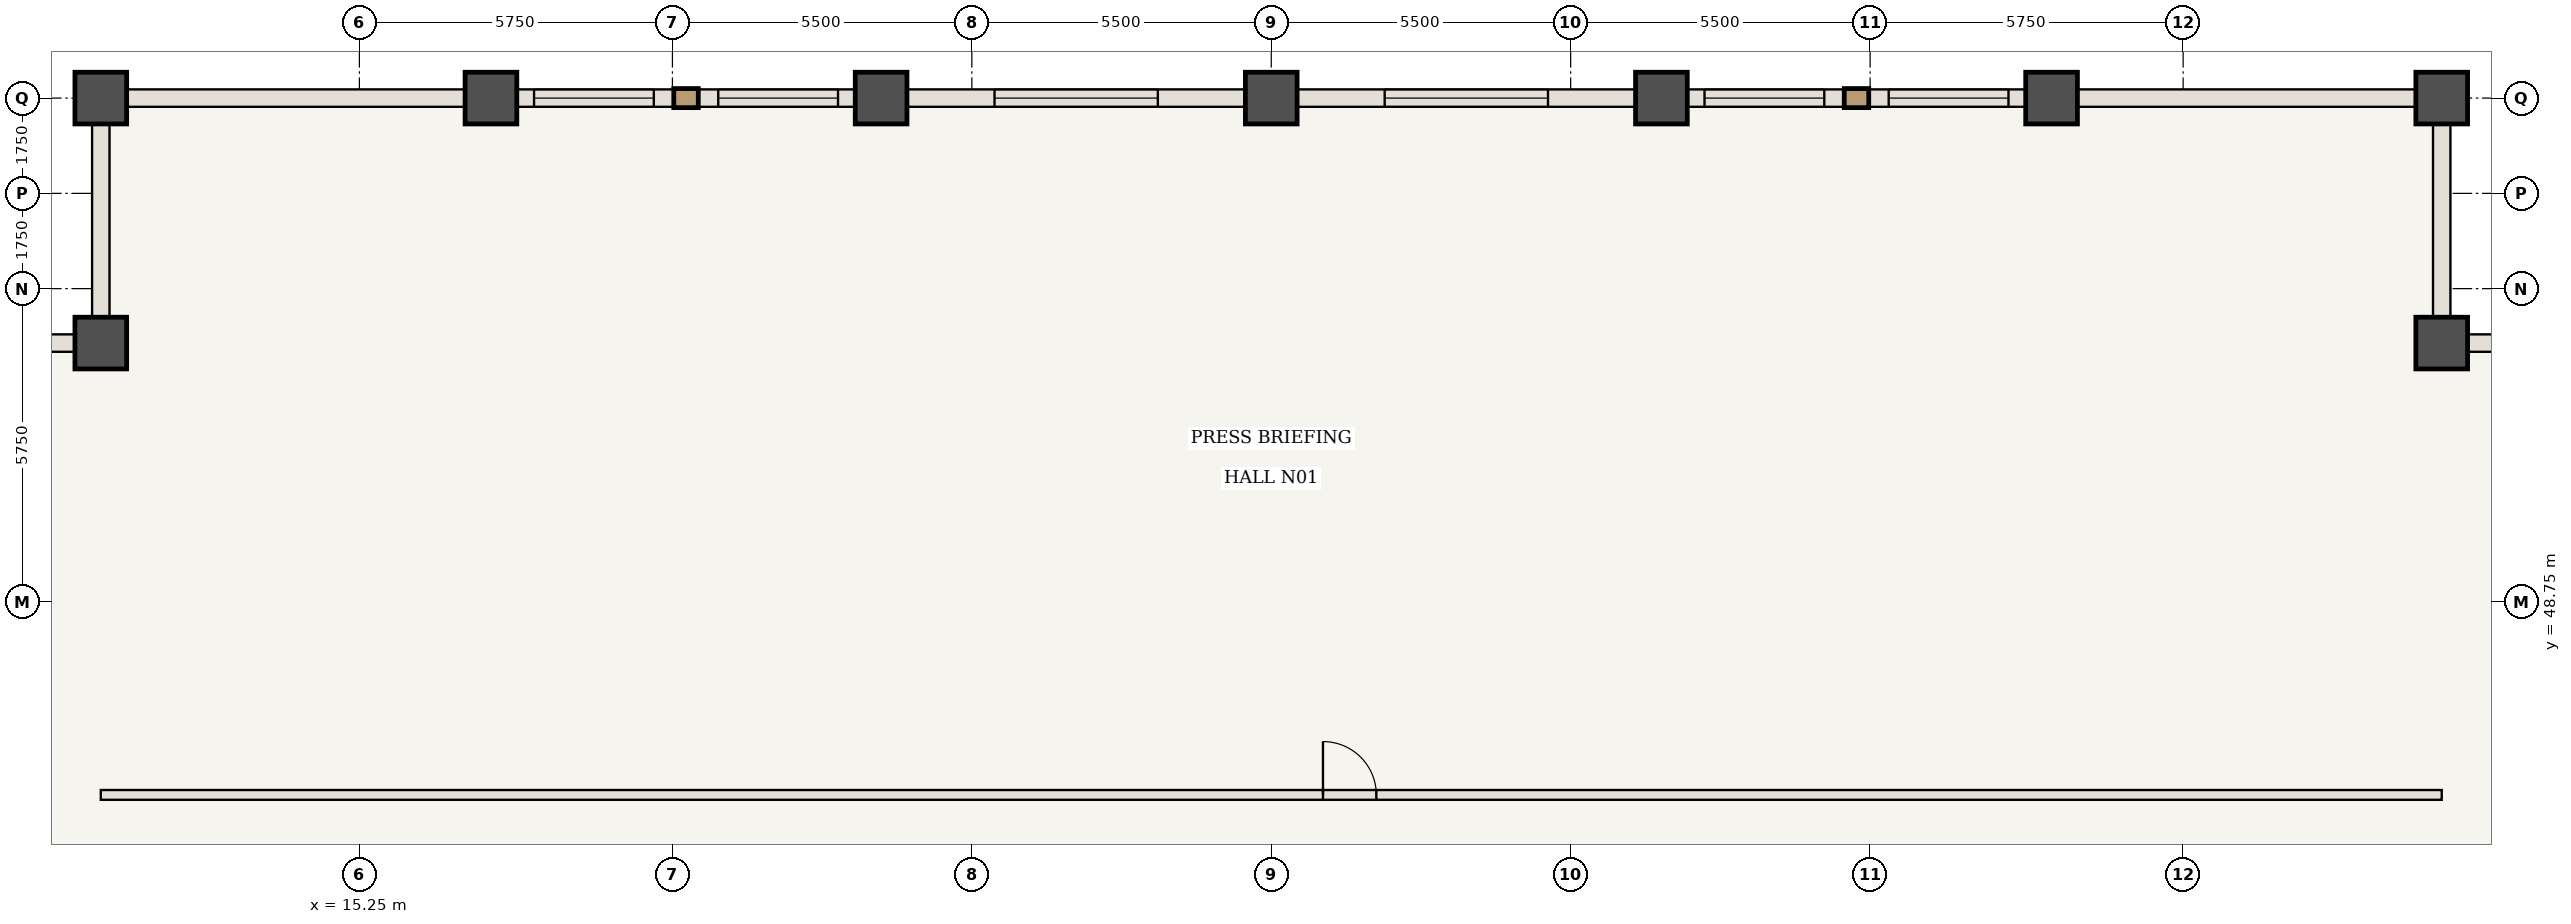
"""IFC4 building model, lengths in metres.
Left out: names, types, materials, properties, quantities, classifications, styles, units other than length and angle.
Written with IfcOpenShell. Run it as: python <this file> out.ifc"""

import sys

from ifc_helpers import new_model, si_unit, direction, frame, frame_2d, origin, origin_2d, place, context, subcontext, project, spatial, rectangle, extrude, element, fill, save


model = new_model("IFC4")
c1 = context("Model", 3, precision=1e-05, world=origin(), true_north=direction((0.0, 1.0)))
c2 = subcontext(c1, "Body", "Model", "MODEL_VIEW")
j1 = project(units=[si_unit("LENGTHUNIT", "METRE"), si_unit("PLANEANGLEUNIT", "RADIAN")], contexts=[c1])
p1 = place(None, origin())
s1 = spatial("IfcSite", under=j1, at=p1, CompositionType="ELEMENT")
p2 = place(p1, origin())
s2 = spatial("IfcBuilding", under=s1, at=p2, CompositionType="ELEMENT")
p3 = place(p2, frame((0.0, 0.0, 160.65)))
s3 = spatial("IfcBuildingStorey", under=s2, at=p3, CompositionType="ELEMENT", Elevation=160.65)
for number, where, z_axis, x_axis in (
    (1, (53.5, 53.5, 0.0), (0.0, 0.0, 1.0), (1.0, 0.0, 0.0)),
    (2, (53.5, 58.0, 0.0), (0.0, 0.0, 1.0), (1.0, 0.0, 0.0)),
    (3, (10.5, 58.0, 0.0), (0.0, 0.0, 1.0), (1.0, 0.0, 0.0)),
    (4, (10.5, 53.5, 0.0), (0.0, 0.0, 1.0), (1.0, 0.0, 0.0)),
    (5, (17.667, 58.0, 0.0), (0.0, 0.0, 1.0), (1.0, 0.0, 0.0)),
    (6, (24.833, 58.0, 0.0), (0.0, 0.0, 1.0), (1.0, 0.0, 0.0)),
    (7, (32.0, 58.0, 0.0), (0.0, 0.0, 1.0), (1.0, 0.0, 0.0)),
    (8, (39.167, 58.0, 0.0), (0.0, 0.0, 1.0), (1.0, 0.0, 0.0)),
    (9, (46.333, 58.0, 0.0), (0.0, 0.0, 1.0), (1.0, 0.0, 0.0)),
):
    element("IfcColumn", number, at=place(p3, frame(where, z_axis=z_axis, x_axis=x_axis)), inside=s3, PredefinedType="COLUMN", context=c2, shape_type="SweptSolid", body=[
        extrude(rectangle(XDim=0.95, YDim=0.95, at=origin_2d()), origin(), (0.0, 0.0, 1.0), 3.85),
    ])
p4 = place(p3, frame((10.5, 45.2, 0.0), z_axis=(0.0, 0.0, 1.0), x_axis=(1.0, 0.0, 0.0)))
e10 = element("IfcWall", 10, at=p4, inside=s3, PredefinedType="STANDARD", context=c2, shape_type="SweptSolid", body=[
    extrude(rectangle(XDim=43.0, YDim=0.18, at=frame_2d((21.5, 0.0))), origin(), (0.0, 0.0, 1.0), 3.685),
])
p5 = place(p4, frame((22.45, 0.0, 0.0)))
e11 = element("IfcOpeningElement", 11, at=p5, cuts=e10, PredefinedType="OPENING", context=c2, shape_type="SweptSolid", body=[
    extrude(rectangle(XDim=0.98, YDim=2.2, at=frame_2d((0.49, 1.1))), frame((0.0, 0.1, 0.0), z_axis=(0.0, -1.0, 0.0), x_axis=(1.0, 0.0, 0.0)), (0.0, 0.0, 1.0), 0.2),
])
p6 = place(p3, frame((10.5, 58.0, 0.0), z_axis=(0.0, 0.0, 1.0), x_axis=(1.0, 0.0, 0.0)))
e12 = element("IfcWall", 12, at=p6, inside=s3, PredefinedType="USERDEFINED", context=c2, shape_type="SweptSolid", body=[
    extrude(rectangle(XDim=7.167, YDim=0.32, at=frame_2d((3.583, 0.0))), origin(), (0.0, 0.0, 1.0), 2.885),
])
p7 = place(p3, frame((17.667, 58.0, 0.0), z_axis=(0.0, 0.0, 1.0), x_axis=(1.0, 0.0, 0.0)))
e13 = element("IfcWall", 13, at=p7, inside=s3, PredefinedType="USERDEFINED", context=c2, shape_type="SweptSolid", body=[
    extrude(rectangle(XDim=7.167, YDim=0.32, at=frame_2d((3.583, 0.0))), origin(), (0.0, 0.0, 1.0), 2.885),
])
p8 = place(p7, frame((0.792, 0.0, 0.85)))
e14 = element("IfcOpeningElement", 14, at=p8, cuts=e13, PredefinedType="OPENING", context=c2, shape_type="SweptSolid", body=[
    extrude(rectangle(XDim=2.2, YDim=1.835, at=frame_2d((1.1, 0.917))), frame((0.0, 0.17, 0.0), z_axis=(0.0, -1.0, 0.0), x_axis=(1.0, 0.0, 0.0)), (0.0, 0.0, 1.0), 0.34),
])
p9 = place(p7, frame((4.175, 0.0, 0.85)))
e15 = element("IfcOpeningElement", 15, at=p9, cuts=e13, PredefinedType="OPENING", context=c2, shape_type="SweptSolid", body=[
    extrude(rectangle(XDim=2.2, YDim=1.835, at=frame_2d((1.1, 0.917))), frame((0.0, 0.17, 0.0), z_axis=(0.0, -1.0, 0.0), x_axis=(1.0, 0.0, 0.0)), (0.0, 0.0, 1.0), 0.34),
])
p10 = place(p3, frame((24.833, 58.0, 0.0), z_axis=(0.0, 0.0, 1.0), x_axis=(1.0, 0.0, 0.0)))
e16 = element("IfcWall", 16, at=p10, inside=s3, PredefinedType="USERDEFINED", context=c2, shape_type="SweptSolid", body=[
    extrude(rectangle(XDim=7.167, YDim=0.32, at=frame_2d((3.583, 0.0))), origin(), (0.0, 0.0, 1.0), 2.885),
])
p11 = place(p10, frame((2.083, 0.0, 0.85)))
e17 = element("IfcOpeningElement", 17, at=p11, cuts=e16, PredefinedType="OPENING", context=c2, shape_type="SweptSolid", body=[
    extrude(rectangle(XDim=3.0, YDim=1.835, at=frame_2d((1.5, 0.917))), frame((0.0, 0.17, 0.0), z_axis=(0.0, -1.0, 0.0), x_axis=(1.0, 0.0, 0.0)), (0.0, 0.0, 1.0), 0.34),
])
p12 = place(p3, frame((32.0, 58.0, 0.0), z_axis=(0.0, 0.0, 1.0), x_axis=(1.0, 0.0, 0.0)))
e18 = element("IfcWall", 18, at=p12, inside=s3, PredefinedType="USERDEFINED", context=c2, shape_type="SweptSolid", body=[
    extrude(rectangle(XDim=7.167, YDim=0.32, at=frame_2d((3.583, 0.0))), origin(), (0.0, 0.0, 1.0), 2.885),
])
p13 = place(p12, frame((2.083, 0.0, 0.85)))
e19 = element("IfcOpeningElement", 19, at=p13, cuts=e18, PredefinedType="OPENING", context=c2, shape_type="SweptSolid", body=[
    extrude(rectangle(XDim=3.0, YDim=1.835, at=frame_2d((1.5, 0.917))), frame((0.0, 0.17, 0.0), z_axis=(0.0, -1.0, 0.0), x_axis=(1.0, 0.0, 0.0)), (0.0, 0.0, 1.0), 0.34),
])
p14 = place(p3, frame((39.167, 58.0, 0.0), z_axis=(0.0, 0.0, 1.0), x_axis=(1.0, 0.0, 0.0)))
e20 = element("IfcWall", 20, at=p14, inside=s3, PredefinedType="USERDEFINED", context=c2, shape_type="SweptSolid", body=[
    extrude(rectangle(XDim=7.167, YDim=0.32, at=frame_2d((3.583, 0.0))), origin(), (0.0, 0.0, 1.0), 2.885),
])
p15 = place(p14, frame((0.792, 0.0, 0.85)))
e21 = element("IfcOpeningElement", 21, at=p15, cuts=e20, PredefinedType="OPENING", context=c2, shape_type="SweptSolid", body=[
    extrude(rectangle(XDim=2.2, YDim=1.835, at=frame_2d((1.1, 0.917))), frame((0.0, 0.17, 0.0), z_axis=(0.0, -1.0, 0.0), x_axis=(1.0, 0.0, 0.0)), (0.0, 0.0, 1.0), 0.34),
])
p16 = place(p14, frame((4.175, 0.0, 0.85)))
e22 = element("IfcOpeningElement", 22, at=p16, cuts=e20, PredefinedType="OPENING", context=c2, shape_type="SweptSolid", body=[
    extrude(rectangle(XDim=2.2, YDim=1.835, at=frame_2d((1.1, 0.917))), frame((0.0, 0.17, 0.0), z_axis=(0.0, -1.0, 0.0), x_axis=(1.0, 0.0, 0.0)), (0.0, 0.0, 1.0), 0.34),
])
p17 = place(p3, frame((46.333, 58.0, 0.0), z_axis=(0.0, 0.0, 1.0), x_axis=(1.0, 0.0, 0.0)))
e23 = element("IfcWall", 23, at=p17, inside=s3, PredefinedType="USERDEFINED", context=c2, shape_type="SweptSolid", body=[
    extrude(rectangle(XDim=7.167, YDim=0.32, at=frame_2d((3.583, 0.0))), origin(), (0.0, 0.0, 1.0), 2.885),
])
for number, where, z_axis, x_axis in (
    (24, (53.5, 53.5, 0.0), (0.0, 0.0, 1.0), (1.0, 0.0, 0.0)),
    (25, (53.5, 58.0, 0.0), (0.0, 0.0, 1.0), (0.0, -1.0, 0.0)),
    (26, (10.5, 53.5, 0.0), (0.0, 0.0, 1.0), (0.0, 1.0, 0.0)),
    (27, (6.0, 53.5, 0.0), (0.0, 0.0, 1.0), (1.0, 0.0, 0.0)),
):
    element("IfcWall", number, at=place(p3, frame(where, z_axis=z_axis, x_axis=x_axis)), inside=s3, PredefinedType="USERDEFINED", context=c2, shape_type="SweptSolid", body=[
        extrude(rectangle(XDim=4.5, YDim=0.32, at=frame_2d((2.25, 0.0))), origin(), (0.0, 0.0, 1.0), 2.885),
    ])
p18 = place(p5, origin())
e28 = element("IfcDoor", 28, at=p18, inside=s3, OperationType="SINGLE_SWING_LEFT", PredefinedType="DOOR", context=c2, shape_type="SweptSolid", body=[
    extrude(rectangle(XDim=0.98, YDim=2.2, at=frame_2d((0.49, 1.1))), frame((0.0, 0.025, 0.0), z_axis=(0.0, -1.0, 0.0), x_axis=(1.0, 0.0, 0.0)), (0.0, 0.0, 1.0), 0.05),
])
fill(e11, e28)
p19 = place(p8, origin())
e29 = element("IfcWindow", 29, at=p19, inside=s3, PartitioningType="SINGLE_PANEL", PredefinedType="WINDOW", context=c2, shape_type="SweptSolid", body=[
    extrude(rectangle(XDim=2.2, YDim=1.835, at=frame_2d((1.1, 0.917))), frame((0.0, 0.03, 0.0), z_axis=(0.0, -1.0, 0.0), x_axis=(1.0, 0.0, 0.0)), (0.0, 0.0, 1.0), 0.06),
])
fill(e14, e29)
p20 = place(p9, origin())
e30 = element("IfcWindow", 30, at=p20, inside=s3, PartitioningType="SINGLE_PANEL", PredefinedType="WINDOW", context=c2, shape_type="SweptSolid", body=[
    extrude(rectangle(XDim=2.2, YDim=1.835, at=frame_2d((1.1, 0.917))), frame((0.0, 0.03, 0.0), z_axis=(0.0, -1.0, 0.0), x_axis=(1.0, 0.0, 0.0)), (0.0, 0.0, 1.0), 0.06),
])
fill(e15, e30)
p21 = place(p11, origin())
e31 = element("IfcWindow", 31, at=p21, inside=s3, PartitioningType="SINGLE_PANEL", PredefinedType="WINDOW", context=c2, shape_type="SweptSolid", body=[
    extrude(rectangle(XDim=3.0, YDim=1.835, at=frame_2d((1.5, 0.917))), frame((0.0, 0.03, 0.0), z_axis=(0.0, -1.0, 0.0), x_axis=(1.0, 0.0, 0.0)), (0.0, 0.0, 1.0), 0.06),
])
fill(e17, e31)
p22 = place(p13, origin())
e32 = element("IfcWindow", 32, at=p22, inside=s3, PartitioningType="SINGLE_PANEL", PredefinedType="WINDOW", context=c2, shape_type="SweptSolid", body=[
    extrude(rectangle(XDim=3.0, YDim=1.835, at=frame_2d((1.5, 0.917))), frame((0.0, 0.03, 0.0), z_axis=(0.0, -1.0, 0.0), x_axis=(1.0, 0.0, 0.0)), (0.0, 0.0, 1.0), 0.06),
])
fill(e19, e32)
p23 = place(p15, origin())
e33 = element("IfcWindow", 33, at=p23, inside=s3, PartitioningType="SINGLE_PANEL", PredefinedType="WINDOW", context=c2, shape_type="SweptSolid", body=[
    extrude(rectangle(XDim=2.2, YDim=1.835, at=frame_2d((1.1, 0.917))), frame((0.0, 0.03, 0.0), z_axis=(0.0, -1.0, 0.0), x_axis=(1.0, 0.0, 0.0)), (0.0, 0.0, 1.0), 0.06),
])
fill(e21, e33)
p24 = place(p16, origin())
e34 = element("IfcWindow", 34, at=p24, inside=s3, PartitioningType="SINGLE_PANEL", PredefinedType="WINDOW", context=c2, shape_type="SweptSolid", body=[
    extrude(rectangle(XDim=2.2, YDim=1.835, at=frame_2d((1.1, 0.917))), frame((0.0, 0.03, 0.0), z_axis=(0.0, -1.0, 0.0), x_axis=(1.0, 0.0, 0.0)), (0.0, 0.0, 1.0), 0.06),
])
fill(e22, e34)
save(model, sys.argv[1])
